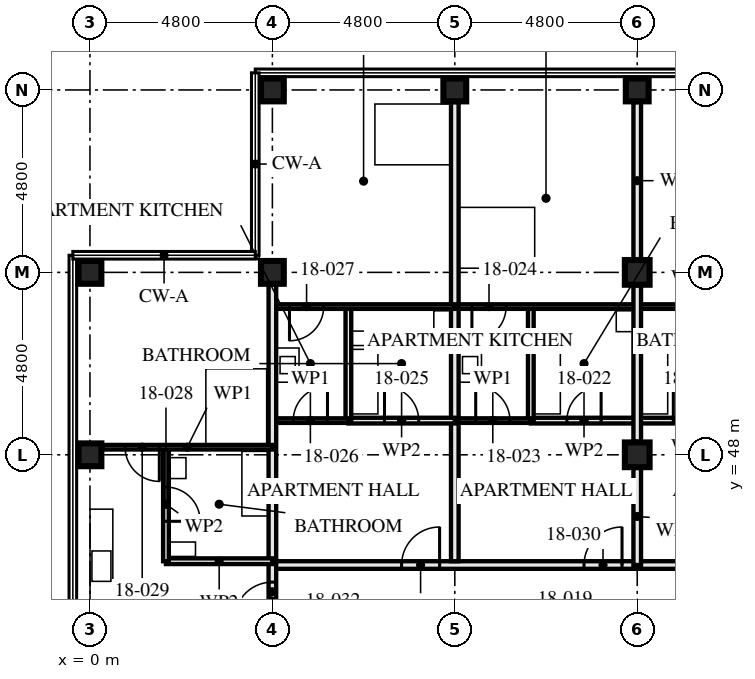
"""IFC4 building model, lengths in metres.
Left out: names, types, materials, properties, quantities, classifications, styles, units other than length and angle.
Written with IfcOpenShell. Run it as: python <this file> out.ifc"""

import sys

from ifc_helpers import new_model, si_unit, direction, frame, frame_2d, origin, origin_2d, place, context, subcontext, project, spatial, rectangle, hollow_rectangle, extrude, element, fill, save


model = new_model("IFC4")
c1 = context("Model", 3, precision=1e-05, world=origin(), true_north=direction((0.0, 1.0)))
c2 = subcontext(c1, "Body", "Model", "MODEL_VIEW")
j1 = project(units=[si_unit("LENGTHUNIT", "METRE"), si_unit("PLANEANGLEUNIT", "RADIAN")], contexts=[c1])
p1 = place(None, origin())
s1 = spatial("IfcSite", under=j1, at=p1, CompositionType="ELEMENT")
p2 = place(p1, origin())
s2 = spatial("IfcBuilding", under=s1, at=p2, CompositionType="ELEMENT")
p3 = place(p2, frame((0.0, 0.0, 69.0)))
s3 = spatial("IfcBuildingStorey", under=s2, at=p3, CompositionType="ELEMENT", Elevation=69.0)
for number, where, z_axis, x_axis in (
    (1, (0.0, 48.0, 0.0), (0.0, 0.0, 1.0), (1.0, 0.0, 0.0)),
    (2, (0.0, 52.8, 0.0), (0.0, 0.0, 1.0), (0.0, 1.0, 0.0)),
    (3, (4.8, 52.8, 0.0), (0.0, 0.0, 1.0), (0.0, 1.0, 0.0)),
    (4, (4.8, 57.6, 0.0), (0.0, 0.0, 1.0), (0.0, 1.0, 0.0)),
    (5, (9.6, 57.6, 0.0), (0.0, 0.0, 1.0), (0.0, 1.0, 0.0)),
):
    element("IfcColumn", number, at=place(p3, frame(where, z_axis=z_axis, x_axis=x_axis)), inside=s3, PredefinedType="COLUMN", context=c2, shape_type="SweptSolid", body=[
        extrude(hollow_rectangle(XDim=0.6, YDim=0.6, WallThickness=0.08, at=origin_2d()), origin(), (0.0, 0.0, 1.0), 3.5),
    ])
for number, where, z_axis, x_axis in (
    (6, (14.4, 48.0, 0.0), (0.0, 0.0, 1.0), (1.0, 0.0, 0.0)),
    (7, (14.4, 52.8, 0.0), (0.0, 0.0, 1.0), (1.0, 0.0, 0.0)),
):
    element("IfcColumn", number, at=place(p3, frame(where, z_axis=z_axis, x_axis=x_axis)), inside=s3, PredefinedType="COLUMN", context=c2, shape_type="SweptSolid", body=[
        extrude(hollow_rectangle(XDim=0.65, YDim=0.65, WallThickness=0.05, at=origin_2d()), origin(), (0.0, 0.0, 1.0), 3.5),
    ])
p4 = place(p3, frame((14.4, 57.6, 0.0), z_axis=(0.0, 0.0, 1.0), x_axis=(0.0, 1.0, 0.0)))
e8 = element("IfcColumn", 8, at=p4, inside=s3, PredefinedType="COLUMN", context=c2, shape_type="SweptSolid", body=[
    extrude(hollow_rectangle(XDim=0.6, YDim=0.6, WallThickness=0.08, at=origin_2d()), origin(), (0.0, 0.0, 1.0), 3.5),
])
p5 = place(p3, frame((11.6, 51.9, 0.0), z_axis=(0.0, 0.0, 1.0), x_axis=(0.0, -1.0, 0.0)))
e9 = element("IfcWall", 9, at=p5, inside=s3, PredefinedType="PARTITIONING", context=c2, shape_type="SweptSolid", body=[
    extrude(rectangle(XDim=3.0, YDim=0.15, at=frame_2d((1.5, 0.0))), origin(), (0.0, 0.0, 1.0), 3.33),
])
p6 = place(p3, frame((14.4, 48.9, 0.0), z_axis=(0.0, 0.0, 1.0), x_axis=(-1.0, 0.0, 0.0)))
e10 = element("IfcWall", 10, at=p6, inside=s3, PredefinedType="PARTITIONING", context=c2, shape_type="SweptSolid", body=[
    extrude(rectangle(XDim=2.8, YDim=0.15, at=frame_2d((1.4, 0.0))), origin(), (0.0, 0.0, 1.0), 3.33),
])
p7 = place(p6, frame((0.95, 0.0, 0.0)))
e11 = element("IfcOpeningElement", 11, at=p7, cuts=e10, PredefinedType="OPENING", context=c2, shape_type="SweptSolid", body=[
    extrude(rectangle(XDim=0.9, YDim=2.1, at=frame_2d((0.45, 1.05))), frame((0.0, 0.085, 0.0), z_axis=(0.0, -1.0, 0.0), x_axis=(1.0, 0.0, 0.0)), (0.0, 0.0, 1.0), 0.171),
])
p8 = place(p3, frame((11.6, 48.9, 0.0), z_axis=(0.0, 0.0, 1.0), x_axis=(-1.0, 0.0, 0.0)))
e12 = element("IfcWall", 12, at=p8, inside=s3, PredefinedType="PARTITIONING", context=c2, shape_type="SweptSolid", body=[
    extrude(rectangle(XDim=2.0, YDim=0.12, at=frame_2d((1.0, 0.0))), origin(), (0.0, 0.0, 1.0), 3.33),
])
p9 = place(p8, frame((0.55, 0.0, 0.0)))
e13 = element("IfcOpeningElement", 13, at=p9, cuts=e12, PredefinedType="OPENING", context=c2, shape_type="SweptSolid", body=[
    extrude(rectangle(XDim=0.9, YDim=2.1, at=frame_2d((0.45, 1.05))), frame((0.0, 0.071, 0.0), z_axis=(0.0, -1.0, 0.0), x_axis=(1.0, 0.0, 0.0)), (0.0, 0.0, 1.0), 0.141),
])
p10 = place(p3, frame((14.4, 51.9, 0.0), z_axis=(0.0, 0.0, 1.0), x_axis=(-1.0, 0.0, 0.0)))
e14 = element("IfcWall", 14, at=p10, inside=s3, PredefinedType="PARTITIONING", context=c2, shape_type="SweptSolid", body=[
    extrude(rectangle(XDim=4.8, YDim=0.12, at=frame_2d((2.4, 0.0))), origin(), (0.0, 0.0, 1.0), 3.33),
])
p11 = place(p10, frame((3.45, 0.0, 0.0)))
e15 = element("IfcOpeningElement", 15, at=p11, cuts=e14, PredefinedType="OPENING", context=c2, shape_type="SweptSolid", body=[
    extrude(rectangle(XDim=0.9, YDim=2.1, at=frame_2d((0.45, 1.05))), frame((0.0, 0.071, 0.0), z_axis=(0.0, -1.0, 0.0), x_axis=(1.0, 0.0, 0.0)), (0.0, 0.0, 1.0), 0.141),
])
p12 = place(p3, frame((9.6, 57.28, 0.0), z_axis=(0.0, 0.0, 1.0), x_axis=(0.0, -1.0, 0.0)))
e16 = element("IfcWall", 16, at=p12, inside=s3, PredefinedType="PARTITIONING", context=c2, shape_type="SweptSolid", body=[
    extrude(rectangle(XDim=12.08, YDim=0.2, at=frame_2d((6.04, 0.0))), origin(), (0.0, 0.0, 1.0), 2.55),
])
p13 = place(p3, frame((6.8, 51.9, 0.0), z_axis=(0.0, 0.0, 1.0), x_axis=(0.0, -1.0, 0.0)))
e17 = element("IfcWall", 17, at=p13, inside=s3, PredefinedType="PARTITIONING", context=c2, shape_type="SweptSolid", body=[
    extrude(rectangle(XDim=3.0, YDim=0.15, at=frame_2d((1.5, 0.0))), origin(), (0.0, 0.0, 1.0), 3.33),
])
p14 = place(p3, frame((9.6, 48.9, 0.0), z_axis=(0.0, 0.0, 1.0), x_axis=(-1.0, 0.0, 0.0)))
e18 = element("IfcWall", 18, at=p14, inside=s3, PredefinedType="PARTITIONING", context=c2, shape_type="SweptSolid", body=[
    extrude(rectangle(XDim=2.8, YDim=0.15, at=frame_2d((1.4, 0.0))), origin(), (0.0, 0.0, 1.0), 3.33),
])
p15 = place(p14, frame((0.95, 0.0, 0.0)))
e19 = element("IfcOpeningElement", 19, at=p15, cuts=e18, PredefinedType="OPENING", context=c2, shape_type="SweptSolid", body=[
    extrude(rectangle(XDim=0.9, YDim=2.1, at=frame_2d((0.45, 1.05))), frame((0.0, 0.085, 0.0), z_axis=(0.0, -1.0, 0.0), x_axis=(1.0, 0.0, 0.0)), (0.0, 0.0, 1.0), 0.171),
])
p16 = place(p3, frame((6.8, 48.9, 0.0), z_axis=(0.0, 0.0, 1.0), x_axis=(-1.0, 0.0, 0.0)))
e20 = element("IfcWall", 20, at=p16, inside=s3, PredefinedType="PARTITIONING", context=c2, shape_type="SweptSolid", body=[
    extrude(rectangle(XDim=2.0, YDim=0.12, at=frame_2d((1.0, 0.0))), origin(), (0.0, 0.0, 1.0), 3.33),
])
p17 = place(p16, frame((0.55, 0.0, 0.0)))
e21 = element("IfcOpeningElement", 21, at=p17, cuts=e20, PredefinedType="OPENING", context=c2, shape_type="SweptSolid", body=[
    extrude(rectangle(XDim=0.9, YDim=2.1, at=frame_2d((0.45, 1.05))), frame((0.0, 0.071, 0.0), z_axis=(0.0, -1.0, 0.0), x_axis=(1.0, 0.0, 0.0)), (0.0, 0.0, 1.0), 0.141),
])
p18 = place(p3, frame((9.6, 51.9, 0.0), z_axis=(0.0, 0.0, 1.0), x_axis=(-1.0, 0.0, 0.0)))
e22 = element("IfcWall", 22, at=p18, inside=s3, PredefinedType="PARTITIONING", context=c2, shape_type="SweptSolid", body=[
    extrude(rectangle(XDim=4.8, YDim=0.12, at=frame_2d((2.4, 0.0))), origin(), (0.0, 0.0, 1.0), 3.33),
])
p19 = place(p18, frame((3.45, 0.0, 0.0)))
e23 = element("IfcOpeningElement", 23, at=p19, cuts=e22, PredefinedType="OPENING", context=c2, shape_type="SweptSolid", body=[
    extrude(rectangle(XDim=0.9, YDim=2.1, at=frame_2d((0.45, 1.05))), frame((0.0, 0.071, 0.0), z_axis=(0.0, -1.0, 0.0), x_axis=(1.0, 0.0, 0.0)), (0.0, 0.0, 1.0), 0.141),
])
p20 = place(p3, frame((4.8, 52.48, 0.0), z_axis=(0.0, 0.0, 1.0), x_axis=(0.0, -1.0, 0.0)))
e24 = element("IfcWall", 24, at=p20, inside=s3, PredefinedType="PARTITIONING", context=c2, shape_type="SweptSolid", body=[
    extrude(rectangle(XDim=7.28, YDim=0.2, at=frame_2d((3.64, 0.0))), origin(), (0.0, 0.0, 1.0), 2.55),
])
p21 = place(p3, frame((2.0, 48.2, 0.0), z_axis=(0.0, 0.0, 1.0), x_axis=(0.0, -1.0, 0.0)))
e25 = element("IfcWall", 25, at=p21, inside=s3, PredefinedType="PARTITIONING", context=c2, shape_type="SweptSolid", body=[
    extrude(rectangle(XDim=3.0, YDim=0.15, at=frame_2d((1.5, 0.0))), origin(), (0.0, 0.0, 1.0), 2.55),
])
p22 = place(p21, frame((1.05, 0.0, 0.0)))
e26 = element("IfcOpeningElement", 26, at=p22, cuts=e25, PredefinedType="OPENING", context=c2, shape_type="SweptSolid", body=[
    extrude(rectangle(XDim=0.9, YDim=2.1, at=frame_2d((0.45, 1.05))), frame((0.0, 0.085, 0.0), z_axis=(0.0, -1.0, 0.0), x_axis=(1.0, 0.0, 0.0)), (0.0, 0.0, 1.0), 0.171),
])
p23 = place(p3, frame((4.8, 45.2, 0.0), z_axis=(0.0, 0.0, 1.0), x_axis=(-1.0, 0.0, 0.0)))
e27 = element("IfcWall", 27, at=p23, inside=s3, PredefinedType="PARTITIONING", context=c2, shape_type="SweptSolid", body=[
    extrude(rectangle(XDim=2.8, YDim=0.15, at=frame_2d((1.4, 0.0))), origin(), (0.0, 0.0, 1.0), 3.33),
])
p24 = place(p3, frame((4.8, 48.2, 0.0), z_axis=(0.0, 0.0, 1.0), x_axis=(-1.0, 0.0, 0.0)))
e28 = element("IfcWall", 28, at=p24, inside=s3, PredefinedType="PARTITIONING", context=c2, shape_type="SweptSolid", body=[
    extrude(rectangle(XDim=4.48, YDim=0.12, at=frame_2d((2.24, 0.0))), origin(), (0.0, 0.0, 1.0), 3.33),
])
p25 = place(p24, frame((2.975, 0.0, 0.0)))
e29 = element("IfcOpeningElement", 29, at=p25, cuts=e28, PredefinedType="OPENING", context=c2, shape_type="SweptSolid", body=[
    extrude(rectangle(XDim=0.9, YDim=2.1, at=frame_2d((0.45, 1.05))), frame((0.0, 0.071, 0.0), z_axis=(0.0, -1.0, 0.0), x_axis=(1.0, 0.0, 0.0)), (0.0, 0.0, 1.0), 0.141),
])
p26 = place(p3, frame((14.4, 45.1, 0.0), z_axis=(0.0, 0.0, 1.0), x_axis=(-1.0, 0.0, 0.0)))
e30 = element("IfcWall", 30, at=p26, inside=s3, PredefinedType="PARTITIONING", context=c2, shape_type="SweptSolid", body=[
    extrude(rectangle(XDim=9.6, YDim=0.2, at=frame_2d((4.8, 0.0))), origin(), (0.0, 0.0, 1.0), 3.33),
])
p27 = place(p26, frame((0.4, 0.0, 0.0)))
e31 = element("IfcOpeningElement", 31, at=p27, cuts=e30, PredefinedType="OPENING", context=c2, shape_type="SweptSolid", body=[
    extrude(rectangle(XDim=1.0, YDim=2.1, at=frame_2d((0.5, 1.05))), frame((0.0, 0.111, 0.0), z_axis=(0.0, -1.0, 0.0), x_axis=(1.0, 0.0, 0.0)), (0.0, 0.0, 1.0), 0.221),
])
p28 = place(p26, frame((5.2, 0.0, 0.0)))
e32 = element("IfcOpeningElement", 32, at=p28, cuts=e30, PredefinedType="OPENING", context=c2, shape_type="SweptSolid", body=[
    extrude(rectangle(XDim=1.0, YDim=2.1, at=frame_2d((0.5, 1.05))), frame((0.0, 0.111, 0.0), z_axis=(0.0, -1.0, 0.0), x_axis=(1.0, 0.0, 0.0)), (0.0, 0.0, 1.0), 0.221),
])
p29 = place(p3, frame((4.8, 45.2, 0.0), z_axis=(0.0, 0.0, 1.0), x_axis=(0.0, -1.0, 0.0)))
e33 = element("IfcWall", 33, at=p29, inside=s3, PredefinedType="PARTITIONING", context=c2, shape_type="SweptSolid", body=[
    extrude(rectangle(XDim=1.605, YDim=0.2, at=frame_2d((0.802, 0.0))), origin(), (0.0, 0.0, 1.0), 3.33),
])
p30 = place(p29, frame((0.55, 0.0, 0.0)))
e34 = element("IfcOpeningElement", 34, at=p30, cuts=e33, PredefinedType="OPENING", context=c2, shape_type="SweptSolid", body=[
    extrude(rectangle(XDim=1.0, YDim=2.1, at=frame_2d((0.5, 1.05))), frame((0.0, 0.111, 0.0), z_axis=(0.0, -1.0, 0.0), x_axis=(1.0, 0.0, 0.0)), (0.0, 0.0, 1.0), 0.221),
])
p31 = place(p3, frame((17.2, 48.9, 0.0), z_axis=(0.0, 0.0, 1.0), x_axis=(-1.0, 0.0, 0.0)))
e35 = element("IfcWall", 35, at=p31, inside=s3, PredefinedType="PARTITIONING", context=c2, shape_type="SweptSolid", body=[
    extrude(rectangle(XDim=2.8, YDim=0.15, at=frame_2d((1.4, 0.0))), origin(), (0.0, 0.0, 1.0), 3.33),
])
p32 = place(p31, frame((0.95, 0.0, 0.0)))
e36 = element("IfcOpeningElement", 36, at=p32, cuts=e35, PredefinedType="OPENING", context=c2, shape_type="SweptSolid", body=[
    extrude(rectangle(XDim=0.9, YDim=2.1, at=frame_2d((0.45, 1.05))), frame((0.0, 0.085, 0.0), z_axis=(0.0, -1.0, 0.0), x_axis=(1.0, 0.0, 0.0)), (0.0, 0.0, 1.0), 0.171),
])
p33 = place(p3, frame((19.2, 51.9, 0.0), z_axis=(0.0, 0.0, 1.0), x_axis=(-1.0, 0.0, 0.0)))
e37 = element("IfcWall", 37, at=p33, inside=s3, PredefinedType="PARTITIONING", context=c2, shape_type="SweptSolid", body=[
    extrude(rectangle(XDim=4.8, YDim=0.12, at=frame_2d((2.4, 0.0))), origin(), (0.0, 0.0, 1.0), 3.33),
])
p34 = place(p33, frame((0.45, 0.0, 0.0)))
e38 = element("IfcOpeningElement", 38, at=p34, cuts=e37, PredefinedType="OPENING", context=c2, shape_type="SweptSolid", body=[
    extrude(rectangle(XDim=0.9, YDim=2.1, at=frame_2d((0.45, 1.05))), frame((0.0, 0.071, 0.0), z_axis=(0.0, -1.0, 0.0), x_axis=(1.0, 0.0, 0.0)), (0.0, 0.0, 1.0), 0.141),
])
p35 = place(p3, frame((28.8, 45.1, 0.0), z_axis=(0.0, 0.0, 1.0), x_axis=(-1.0, 0.0, 0.0)))
e39 = element("IfcWall", 39, at=p35, inside=s3, PredefinedType="PARTITIONING", context=c2, shape_type="SweptSolid", body=[
    extrude(rectangle(XDim=14.4, YDim=0.2, at=frame_2d((7.2, 0.0))), origin(), (0.0, 0.0, 1.0), 3.33),
])
p36 = place(p35, frame((0.4, 0.0, 0.0)))
e40 = element("IfcOpeningElement", 40, at=p36, cuts=e39, PredefinedType="OPENING", context=c2, shape_type="SweptSolid", body=[
    extrude(rectangle(XDim=1.0, YDim=2.1, at=frame_2d((0.5, 1.05))), frame((0.0, 0.111, 0.0), z_axis=(0.0, -1.0, 0.0), x_axis=(1.0, 0.0, 0.0)), (0.0, 0.0, 1.0), 0.221),
])
p37 = place(p35, frame((5.2, 0.0, 0.0)))
e41 = element("IfcOpeningElement", 41, at=p37, cuts=e39, PredefinedType="OPENING", context=c2, shape_type="SweptSolid", body=[
    extrude(rectangle(XDim=1.0, YDim=2.1, at=frame_2d((0.5, 1.05))), frame((0.0, 0.111, 0.0), z_axis=(0.0, -1.0, 0.0), x_axis=(1.0, 0.0, 0.0)), (0.0, 0.0, 1.0), 0.221),
])
p38 = place(p35, frame((10.0, 0.0, 0.0)))
e42 = element("IfcOpeningElement", 42, at=p38, cuts=e39, PredefinedType="OPENING", context=c2, shape_type="SweptSolid", body=[
    extrude(rectangle(XDim=1.0, YDim=2.1, at=frame_2d((0.5, 1.05))), frame((0.0, 0.111, 0.0), z_axis=(0.0, -1.0, 0.0), x_axis=(1.0, 0.0, 0.0)), (0.0, 0.0, 1.0), 0.221),
])
p39 = place(p3, frame((14.4, 45.1, 0.0), z_axis=(0.0, 0.0, 1.0), x_axis=(0.0, 1.0, 0.0)))
e43 = element("IfcWall", 43, at=p39, inside=s3, PredefinedType="PARTITIONING", context=c2, shape_type="SweptSolid", body=[
    extrude(rectangle(XDim=2.555, YDim=0.2, at=frame_2d((1.277, 0.0))), origin(), (0.0, 0.0, 1.0), 2.32),
])
p40 = place(p3, frame((14.4, 48.345, 0.0), z_axis=(0.0, 0.0, 1.0), x_axis=(0.0, 1.0, 0.0)))
e44 = element("IfcWall", 44, at=p40, inside=s3, PredefinedType="PARTITIONING", context=c2, shape_type="SweptSolid", body=[
    extrude(rectangle(XDim=4.11, YDim=0.2, at=frame_2d((2.055, 0.0))), origin(), (0.0, 0.0, 1.0), 2.32),
])
p41 = place(p3, frame((14.4, 53.145, 0.0), z_axis=(0.0, 0.0, 1.0), x_axis=(0.0, 1.0, 0.0)))
e45 = element("IfcWall", 45, at=p41, inside=s3, PredefinedType="PARTITIONING", context=c2, shape_type="SweptSolid", body=[
    extrude(rectangle(XDim=4.135, YDim=0.2, at=frame_2d((2.067, 0.0))), origin(), (0.0, 0.0, 1.0), 2.32),
])
p42 = place(p7, frame((0.9, 0.0, 0.0), z_axis=(0.0, 0.0, 1.0), x_axis=(-1.0, 0.0, 0.0)))
e46 = element("IfcDoor", 46, at=p42, inside=s3, OperationType="SINGLE_SWING_LEFT", PredefinedType="DOOR", context=c2, shape_type="SweptSolid", body=[
    extrude(rectangle(XDim=0.9, YDim=2.1, at=frame_2d((0.45, 1.05))), frame((0.0, 0.022, 0.0), z_axis=(0.0, -1.0, 0.0), x_axis=(1.0, 0.0, 0.0)), (0.0, 0.0, 1.0), 0.044),
])
fill(e11, e46)
p43 = place(p9, frame((0.9, 0.0, 0.0), z_axis=(0.0, 0.0, 1.0), x_axis=(-1.0, 0.0, 0.0)))
e47 = element("IfcDoor", 47, at=p43, inside=s3, OperationType="SINGLE_SWING_RIGHT", PredefinedType="DOOR", context=c2, shape_type="SweptSolid", body=[
    extrude(rectangle(XDim=0.9, YDim=2.1, at=frame_2d((0.45, 1.05))), frame((0.0, 0.022, 0.0), z_axis=(0.0, -1.0, 0.0), x_axis=(1.0, 0.0, 0.0)), (0.0, 0.0, 1.0), 0.044),
])
fill(e13, e47)
p44 = place(p11, origin())
e48 = element("IfcDoor", 48, at=p44, inside=s3, OperationType="SINGLE_SWING_LEFT", PredefinedType="DOOR", context=c2, shape_type="SweptSolid", body=[
    extrude(rectangle(XDim=0.9, YDim=2.1, at=frame_2d((0.45, 1.05))), frame((0.0, 0.022, 0.0), z_axis=(0.0, -1.0, 0.0), x_axis=(1.0, 0.0, 0.0)), (0.0, 0.0, 1.0), 0.044),
])
fill(e15, e48)
p45 = place(p15, frame((0.9, 0.0, 0.0), z_axis=(0.0, 0.0, 1.0), x_axis=(-1.0, 0.0, 0.0)))
e49 = element("IfcDoor", 49, at=p45, inside=s3, OperationType="SINGLE_SWING_RIGHT", PredefinedType="DOOR", context=c2, shape_type="SweptSolid", body=[
    extrude(rectangle(XDim=0.9, YDim=2.1, at=frame_2d((0.45, 1.05))), frame((0.0, 0.022, 0.0), z_axis=(0.0, -1.0, 0.0), x_axis=(1.0, 0.0, 0.0)), (0.0, 0.0, 1.0), 0.044),
])
fill(e19, e49)
p46 = place(p17, frame((0.9, 0.0, 0.0), z_axis=(0.0, 0.0, 1.0), x_axis=(-1.0, 0.0, 0.0)))
e50 = element("IfcDoor", 50, at=p46, inside=s3, OperationType="SINGLE_SWING_LEFT", PredefinedType="DOOR", context=c2, shape_type="SweptSolid", body=[
    extrude(rectangle(XDim=0.9, YDim=2.1, at=frame_2d((0.45, 1.05))), frame((0.0, 0.022, 0.0), z_axis=(0.0, -1.0, 0.0), x_axis=(1.0, 0.0, 0.0)), (0.0, 0.0, 1.0), 0.044),
])
fill(e21, e50)
p47 = place(p19, origin())
e51 = element("IfcDoor", 51, at=p47, inside=s3, OperationType="SINGLE_SWING_LEFT", PredefinedType="DOOR", context=c2, shape_type="SweptSolid", body=[
    extrude(rectangle(XDim=0.9, YDim=2.1, at=frame_2d((0.45, 1.05))), frame((0.0, 0.022, 0.0), z_axis=(0.0, -1.0, 0.0), x_axis=(1.0, 0.0, 0.0)), (0.0, 0.0, 1.0), 0.044),
])
fill(e23, e51)
p48 = place(p22, origin())
e52 = element("IfcDoor", 52, at=p48, inside=s3, OperationType="SINGLE_SWING_LEFT", PredefinedType="DOOR", context=c2, shape_type="SweptSolid", body=[
    extrude(rectangle(XDim=0.9, YDim=2.1, at=frame_2d((0.45, 1.05))), frame((0.0, 0.022, 0.0), z_axis=(0.0, -1.0, 0.0), x_axis=(1.0, 0.0, 0.0)), (0.0, 0.0, 1.0), 0.044),
])
fill(e26, e52)
p49 = place(p25, origin())
e53 = element("IfcDoor", 53, at=p49, inside=s3, OperationType="SINGLE_SWING_RIGHT", PredefinedType="DOOR", context=c2, shape_type="SweptSolid", body=[
    extrude(rectangle(XDim=0.9, YDim=2.1, at=frame_2d((0.45, 1.05))), frame((0.0, 0.022, 0.0), z_axis=(0.0, -1.0, 0.0), x_axis=(1.0, 0.0, 0.0)), (0.0, 0.0, 1.0), 0.044),
])
fill(e29, e53)
p50 = place(p27, frame((1.0, 0.0, 0.0), z_axis=(0.0, 0.0, 1.0), x_axis=(-1.0, 0.0, 0.0)))
e54 = element("IfcDoor", 54, at=p50, inside=s3, OperationType="SINGLE_SWING_LEFT", PredefinedType="DOOR", context=c2, shape_type="SweptSolid", body=[
    extrude(rectangle(XDim=1.0, YDim=2.1, at=frame_2d((0.5, 1.05))), frame((0.0, 0.027, 0.0), z_axis=(0.0, -1.0, 0.0), x_axis=(1.0, 0.0, 0.0)), (0.0, 0.0, 1.0), 0.054),
])
fill(e31, e54)
p51 = place(p28, frame((1.0, 0.0, 0.0), z_axis=(0.0, 0.0, 1.0), x_axis=(-1.0, 0.0, 0.0)))
e55 = element("IfcDoor", 55, at=p51, inside=s3, OperationType="SINGLE_SWING_LEFT", PredefinedType="DOOR", context=c2, shape_type="SweptSolid", body=[
    extrude(rectangle(XDim=1.0, YDim=2.1, at=frame_2d((0.5, 1.05))), frame((0.0, 0.027, 0.0), z_axis=(0.0, -1.0, 0.0), x_axis=(1.0, 0.0, 0.0)), (0.0, 0.0, 1.0), 0.054),
])
fill(e32, e55)
p52 = place(p30, frame((1.0, 0.0, 0.0), z_axis=(0.0, 0.0, 1.0), x_axis=(-1.0, 0.0, 0.0)))
e56 = element("IfcDoor", 56, at=p52, inside=s3, OperationType="SINGLE_SWING_RIGHT", PredefinedType="DOOR", context=c2, shape_type="SweptSolid", body=[
    extrude(rectangle(XDim=1.0, YDim=2.1, at=frame_2d((0.5, 1.05))), frame((0.0, 0.027, 0.0), z_axis=(0.0, -1.0, 0.0), x_axis=(1.0, 0.0, 0.0)), (0.0, 0.0, 1.0), 0.054),
])
fill(e34, e56)
p53 = place(p32, frame((0.9, 0.0, 0.0), z_axis=(0.0, 0.0, 1.0), x_axis=(-1.0, 0.0, 0.0)))
e57 = element("IfcDoor", 57, at=p53, inside=s3, OperationType="SINGLE_SWING_RIGHT", PredefinedType="DOOR", context=c2, shape_type="SweptSolid", body=[
    extrude(rectangle(XDim=0.9, YDim=2.1, at=frame_2d((0.45, 1.05))), frame((0.0, 0.022, 0.0), z_axis=(0.0, -1.0, 0.0), x_axis=(1.0, 0.0, 0.0)), (0.0, 0.0, 1.0), 0.044),
])
fill(e36, e57)
save(model, sys.argv[1])
